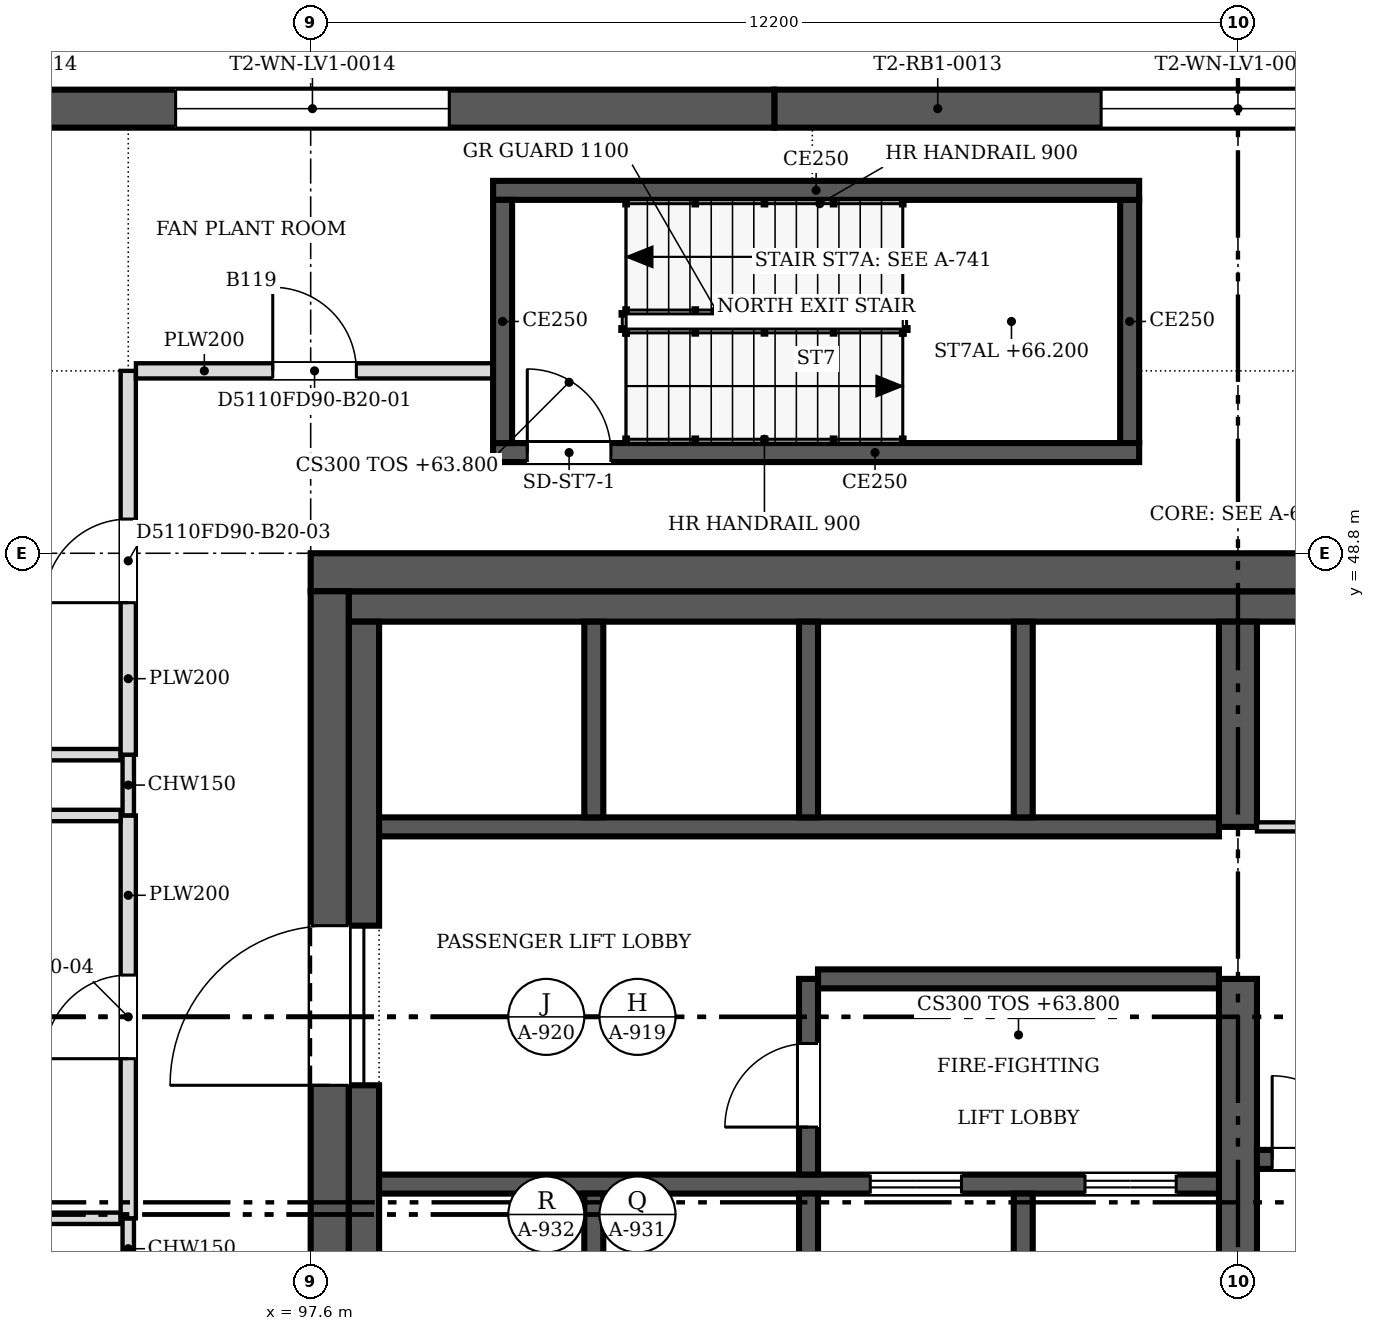
"""IFC4 building model, lengths in metres.
Left out: names, types, materials, properties, quantities, classifications, styles, units other than length and angle.
Written with IfcOpenShell. Run it as: python <this file> out.ifc"""

import sys

from ifc_helpers import new_model, si_unit, direction, frame, frame_2d, origin, place, context, subcontext, project, spatial, polyline, rectangle, outline, extrude, faceted_brep, source, transform, mapped, element, fill, save


model = new_model("IFC4")
c1 = context("Model", 3, precision=1e-05, world=origin(), true_north=direction((0.0, 1.0)))
c2 = subcontext(c1, "Body", "Model", "MODEL_VIEW")
j1 = project(units=[si_unit("LENGTHUNIT", "METRE"), si_unit("PLANEANGLEUNIT", "RADIAN")], contexts=[c1])
p1 = place(None, origin())
s1 = spatial("IfcSite", under=j1, at=p1, CompositionType="ELEMENT")
p2 = place(p1, origin())
s2 = spatial("IfcBuilding", under=s1, at=p2, CompositionType="ELEMENT")
p3 = place(p2, frame((0.0, 0.0, 63.8)))
s3 = spatial("IfcBuildingStorey", under=s2, at=p3, CompositionType="ELEMENT", Elevation=63.8)
m1 = source(origin(), c2, "Body", "SweptSolid", [
    extrude(outline(polyline([(0.0, 0.0), (12.2, 0.0), (12.2, 4.8), (0.0, 4.8), (0.0, 0.0)])), frame((0.0, 0.25, 0.0), z_axis=(0.0, -1.0, 0.0), x_axis=(1.0, 0.0, 0.0)), (0.0, 0.0, 1.0), 0.5),
])
p4 = place(p3, frame((115.9, 54.65, 0.0), z_axis=(0.0, 0.0, 1.0), x_axis=(-1.0, 0.0, 0.0)))
e1 = element("IfcWall", 1, at=p4, inside=s3, PredefinedType="SOLIDWALL", context=c2, shape_type="MappedRepresentation", body=[
    mapped(m1, transform((0.0, 0.0, 0.0), scale=1.0)),
])
m2 = source(origin(), c2, "Body", "SweptSolid", [
    extrude(outline(polyline([(4.3, 0.8), (7.9, 0.8), (7.9, 4.0), (4.3, 4.0), (4.3, 0.8)])), frame((0.0, 0.26, 0.0), z_axis=(0.0, -1.0, 0.0), x_axis=(1.0, 0.0, 0.0)), (0.0, 0.0, 1.0), 0.52),
])
p5 = place(p4, origin())
e2 = element("IfcOpeningElement", 2, at=p5, cuts=e1, PredefinedType="OPENING", context=c2, shape_type="MappedRepresentation", body=[
    mapped(m2, transform((0.0, 0.0, 0.0), scale=1.0)),
])
m3 = source(origin(), c2, "Body", "Brep", [
    faceted_brep([(0.0, -0.25, 0.0), (12.154, -0.25, 0.0), (12.154, -0.25, 4.8), (0.0, -0.25, 4.8), (0.0, 0.25, 4.8), (12.107, 0.25, 4.8), (12.107, 0.25, 0.0), (0.0, 0.25, 0.0), (12.154, -0.0, 0.0), (12.154, -0.0, 4.8)], [[[0, 1, 2, 3]], [[4, 5, 6, 7]], [[7, 6, 8, 1, 0]], [[9, 2, 1, 8]], [[5, 4, 3, 2, 9]], [[4, 7, 0, 3]], [[8, 6, 5, 9]]]),
])
p6 = place(p3, frame((103.7, 54.65, 0.0), z_axis=(0.0, 0.0, 1.0), x_axis=(-1.0, 0.0, 0.0)))
e3 = element("IfcWall", 3, at=p6, inside=s3, PredefinedType="SOLIDWALL", context=c2, shape_type="MappedRepresentation", body=[
    mapped(m3, transform((0.0, 0.0, 0.0), scale=1.0)),
])
m4 = source(origin(), c2, "Body", "SweptSolid", [
    extrude(outline(polyline([(4.277, 0.8), (7.877, 0.8), (7.877, 4.0), (4.277, 4.0), (4.277, 0.8)])), frame((0.0, 0.26, 0.0), z_axis=(0.0, -1.0, 0.0), x_axis=(1.0, 0.0, 0.0)), (0.0, 0.0, 1.0), 0.52),
])
p7 = place(p6, origin())
e4 = element("IfcOpeningElement", 4, at=p7, cuts=e3, PredefinedType="OPENING", context=c2, shape_type="MappedRepresentation", body=[
    mapped(m4, transform((0.0, 0.0, 0.0), scale=1.0)),
])
p8 = place(p3, frame((97.85, 37.1, 0.0), z_axis=(0.0, 0.0, 1.0), x_axis=(0.0, 1.0, 0.0)))
e5 = element("IfcWall", 5, at=p8, inside=s3, PredefinedType="SHEAR", context=c2, shape_type="SweptSolid", body=[
    extrude(rectangle(XDim=11.2, YDim=0.5, at=frame_2d((5.6, 0.0))), origin(), (0.0, 0.0, 1.0), 4.8),
])
m5 = source(origin(), c2, "Body", "SweptSolid", [
    extrude(rectangle(XDim=2.1, YDim=2.4, at=frame_2d((1.05, 1.2))), frame((0.0, 0.26, 0.0), z_axis=(0.0, -1.0, 0.0), x_axis=(1.0, 0.0, 0.0)), (0.0, 0.0, 1.0), 0.52),
])
p9 = place(p8, frame((4.7, 0.0, 0.0)))
e6 = element("IfcOpeningElement", 6, at=p9, cuts=e5, PredefinedType="OPENING", context=c2, shape_type="MappedRepresentation", body=[
    mapped(m5, transform((0.0, 0.0, 0.0), scale=1.0)),
])
p10 = place(p3, frame((97.6, 48.55, 0.0), z_axis=(0.0, 0.0, 1.0), x_axis=(1.0, 0.0, 0.0)))
e7 = element("IfcWall", 7, at=p10, inside=s3, PredefinedType="SHEAR", context=c2, shape_type="SweptSolid", body=[
    extrude(rectangle(XDim=24.4, YDim=0.5, at=frame_2d((12.2, 0.0))), origin(), (0.0, 0.0, 1.0), 4.8),
])
p11 = place(p3, frame((98.1, 48.1, 0.0), z_axis=(0.0, 0.0, 1.0), x_axis=(1.0, 0.0, 0.0)))
e8 = element("IfcWall", 8, at=p11, inside=s3, PredefinedType="SOLIDWALL", context=c2, shape_type="SweptSolid", body=[
    extrude(rectangle(XDim=23.4, YDim=0.4, at=frame_2d((11.7, 0.0))), origin(), (0.0, 0.0, 1.0), 4.8),
])
p12 = place(p3, frame((98.3, 37.5, 0.0), z_axis=(0.0, 0.0, 1.0), x_axis=(0.0, 1.0, 0.0)))
e9 = element("IfcWall", 9, at=p12, inside=s3, PredefinedType="SOLIDWALL", context=c2, shape_type="SweptSolid", body=[
    extrude(rectangle(XDim=4.3, YDim=0.4, at=frame_2d((2.15, 0.0))), origin(), (0.0, 0.0, 1.0), 4.8),
])
p13 = place(p3, frame((98.3, 43.9, 0.0), z_axis=(0.0, 0.0, 1.0), x_axis=(0.0, 1.0, 0.0)))
e10 = element("IfcWall", 10, at=p13, inside=s3, PredefinedType="SOLIDWALL", context=c2, shape_type="SweptSolid", body=[
    extrude(rectangle(XDim=4.0, YDim=0.4, at=frame_2d((2.0, 0.0))), origin(), (0.0, 0.0, 1.0), 4.8),
])
p14 = place(p3, frame((109.8, 37.5, 0.0), z_axis=(0.0, 0.0, 1.0), x_axis=(0.0, 1.0, 0.0)))
e11 = element("IfcWall", 11, at=p14, inside=s3, PredefinedType="SHEAR", context=c2, shape_type="SweptSolid", body=[
    extrude(rectangle(XDim=5.7, YDim=0.5, at=frame_2d((2.85, 0.0))), origin(), (0.0, 0.0, 1.0), 4.8),
])
p15 = place(p3, frame((109.8, 45.2, 0.0), z_axis=(0.0, 0.0, 1.0), x_axis=(0.0, 1.0, 0.0)))
e12 = element("IfcWall", 12, at=p15, inside=s3, PredefinedType="SHEAR", context=c2, shape_type="SweptSolid", body=[
    extrude(rectangle(XDim=2.7, YDim=0.5, at=frame_2d((1.35, 0.0))), origin(), (0.0, 0.0, 1.0), 4.8),
])
p16 = place(p3, frame((98.5, 40.5, 0.0), z_axis=(0.0, 0.0, 1.0), x_axis=(1.0, 0.0, 0.0)))
e13 = element("IfcWall", 13, at=p16, inside=s3, PredefinedType="SOLIDWALL", context=c2, shape_type="SweptSolid", body=[
    extrude(rectangle(XDim=11.05, YDim=0.25, at=frame_2d((5.525, 0.0))), origin(), (0.0, 0.0, 1.0), 4.8),
])
m6 = source(origin(), c2, "Body", "SweptSolid", [
    extrude(rectangle(XDim=1.2, YDim=2.1, at=frame_2d((0.6, 1.05))), frame((0.0, 0.135, 0.0), z_axis=(0.0, -1.0, 0.0), x_axis=(1.0, 0.0, 0.0)), (0.0, 0.0, 1.0), 0.27),
])
p17 = place(p16, frame((6.462, 0.0, 0.0)))
e14 = element("IfcOpeningElement", 14, at=p17, cuts=e13, PredefinedType="OPENING", context=c2, shape_type="MappedRepresentation", body=[
    mapped(m6, transform((0.0, 0.0, 0.0), scale=1.0)),
])
p18 = place(p16, frame((9.288, 0.0, 0.0)))
e15 = element("IfcOpeningElement", 15, at=p18, cuts=e13, PredefinedType="OPENING", context=c2, shape_type="MappedRepresentation", body=[
    mapped(m6, transform((0.0, 0.0, 0.0), scale=1.0)),
])
p19 = place(p3, frame((98.5, 45.2, 0.0), z_axis=(0.0, 0.0, 1.0), x_axis=(1.0, 0.0, 0.0)))
e16 = element("IfcWall", 16, at=p19, inside=s3, PredefinedType="SOLIDWALL", context=c2, shape_type="SweptSolid", body=[
    extrude(rectangle(XDim=11.05, YDim=0.25, at=frame_2d((5.525, 0.0))), origin(), (0.0, 0.0, 1.0), 4.8),
])
p20 = place(p3, frame((118.1, 40.825, 0.0), z_axis=(0.0, 0.0, 1.0), x_axis=(-1.0, 0.0, 0.0)))
e17 = element("IfcWall", 17, at=p20, inside=s3, PredefinedType="SOLIDWALL", context=c2, shape_type="SweptSolid", body=[
    extrude(rectangle(XDim=8.05, YDim=0.25, at=frame_2d((4.025, 0.0))), origin(), (0.0, 0.0, 1.0), 4.8),
])
m7 = source(origin(), c2, "Body", "SweptSolid", [
    extrude(rectangle(XDim=1.1, YDim=2.1, at=frame_2d((0.55, 1.05))), frame((0.0, 0.135, 0.0), z_axis=(0.0, -1.0, 0.0), x_axis=(1.0, 0.0, 0.0)), (0.0, 0.0, 1.0), 0.27),
])
p21 = place(p20, frame((6.75, 0.0, 0.0)))
e18 = element("IfcOpeningElement", 18, at=p21, cuts=e17, PredefinedType="OPENING", context=c2, shape_type="MappedRepresentation", body=[
    mapped(m7, transform((0.0, 0.0, 0.0), scale=1.0)),
])
p22 = place(p3, frame((104.15, 37.5, 0.0), z_axis=(0.0, 0.0, 1.0), x_axis=(0.0, 1.0, 0.0)))
e19 = element("IfcWall", 19, at=p22, inside=s3, PredefinedType="SOLIDWALL", context=c2, shape_type="SweptSolid", body=[
    extrude(rectangle(XDim=2.875, YDim=0.25, at=frame_2d((1.438, 0.0))), origin(), (0.0, 0.0, 1.0), 4.8),
])
p23 = place(p3, frame((104.15, 43.2, 0.0), z_axis=(0.0, 0.0, 1.0), x_axis=(0.0, -1.0, 0.0)))
e20 = element("IfcWall", 20, at=p23, inside=s3, PredefinedType="SOLIDWALL", context=c2, shape_type="SweptSolid", body=[
    extrude(rectangle(XDim=2.575, YDim=0.25, at=frame_2d((1.288, 0.0))), origin(), (0.0, 0.0, 1.0), 4.8),
])
p24 = place(p23, frame((0.85, 0.0, 0.0)))
e21 = element("IfcOpeningElement", 21, at=p24, cuts=e20, PredefinedType="OPENING", context=c2, shape_type="MappedRepresentation", body=[
    mapped(m7, transform((0.0, 0.0, 0.0), scale=1.0)),
])
p25 = place(p3, frame((104.275, 43.2, 0.0), z_axis=(0.0, 0.0, 1.0), x_axis=(1.0, 0.0, 0.0)))
e22 = element("IfcWall", 22, at=p25, inside=s3, PredefinedType="SOLIDWALL", context=c2, shape_type="SweptSolid", body=[
    extrude(rectangle(XDim=5.275, YDim=0.25, at=frame_2d((2.638, 0.0))), origin(), (0.0, 0.0, 1.0), 4.8),
])
for number, where, z_axis, x_axis in (
    (23, (101.325, 37.5, 0.0), (0.0, 0.0, 1.0), (0.0, 1.0, 0.0)),
    (24, (106.975, 37.5, 0.0), (0.0, 0.0, 1.0), (0.0, 1.0, 0.0)),
):
    element("IfcWall", number, at=place(p3, frame(where, z_axis=z_axis, x_axis=x_axis)), inside=s3, PredefinedType="SOLIDWALL", context=c2, shape_type="SweptSolid", body=[
        extrude(rectangle(XDim=2.875, YDim=0.25, at=frame_2d((1.438, 0.0))), origin(), (0.0, 0.0, 1.0), 4.8),
    ])
for number, where, z_axis, x_axis in (
    (25, (101.325, 45.325, 0.0), (0.0, 0.0, 1.0), (0.0, 1.0, 0.0)),
    (26, (104.15, 45.325, 0.0), (0.0, 0.0, 1.0), (0.0, 1.0, 0.0)),
    (27, (106.975, 45.325, 0.0), (0.0, 0.0, 1.0), (0.0, 1.0, 0.0)),
):
    element("IfcWall", number, at=place(p3, frame(where, z_axis=z_axis, x_axis=x_axis)), inside=s3, PredefinedType="SOLIDWALL", context=c2, shape_type="SweptSolid", body=[
        extrude(rectangle(XDim=2.575, YDim=0.25, at=frame_2d((1.288, 0.0))), origin(), (0.0, 0.0, 1.0), 4.8),
    ])
p26 = place(p3, frame((110.05, 45.2, 0.0), z_axis=(0.0, 0.0, 1.0), x_axis=(1.0, 0.0, 0.0)))
e28 = element("IfcWall", 28, at=p26, inside=s3, PredefinedType="PARTITIONING", context=c2, shape_type="SweptSolid", body=[
    extrude(rectangle(XDim=11.05, YDim=0.12, at=frame_2d((5.525, 0.0))), origin(), (0.0, 0.0, 1.0), 4.6),
])
m8 = source(origin(), c2, "Body", "SweptSolid", [
    extrude(rectangle(XDim=0.9, YDim=2.1, at=frame_2d((0.45, 1.05))), frame((0.0, 0.07, 0.0), z_axis=(0.0, -1.0, 0.0), x_axis=(1.0, 0.0, 0.0)), (0.0, 0.0, 1.0), 0.14),
])
p27 = place(p26, frame((2.125, 0.0, 0.0)))
e29 = element("IfcOpeningElement", 29, at=p27, cuts=e28, PredefinedType="OPENING", context=c2, shape_type="MappedRepresentation", body=[
    mapped(m8, transform((0.0, 0.0, 0.0), scale=1.0)),
])
p28 = place(p26, frame((7.775, 0.0, 0.0)))
e30 = element("IfcOpeningElement", 30, at=p28, cuts=e28, PredefinedType="OPENING", context=c2, shape_type="MappedRepresentation", body=[
    mapped(m8, transform((0.0, 0.0, 0.0), scale=1.0)),
])
p29 = place(p3, frame((108.5, 50.125, 0.0), z_axis=(0.0, 0.0, 1.0), x_axis=(-1.0, 0.0, 0.0)))
e31 = element("IfcWall", 31, at=p29, inside=s3, PredefinedType="SOLIDWALL", context=c2, shape_type="SweptSolid", body=[
    extrude(rectangle(XDim=8.5, YDim=0.25, at=frame_2d((4.25, 0.0))), origin(), (0.0, 0.0, 1.0), 4.8),
])
p30 = place(p29, frame((6.95, 0.0, 0.0)))
e32 = element("IfcOpeningElement", 32, at=p30, cuts=e31, PredefinedType="OPENING", context=c2, shape_type="MappedRepresentation", body=[
    mapped(m7, transform((0.0, 0.0, 0.0), scale=1.0)),
])
p31 = place(p3, frame((100.125, 50.25, 0.0), z_axis=(0.0, 0.0, 1.0), x_axis=(0.0, 1.0, 0.0)))
e33 = element("IfcWall", 33, at=p31, inside=s3, PredefinedType="SOLIDWALL", context=c2, shape_type="SweptSolid", body=[
    extrude(rectangle(XDim=3.2, YDim=0.25, at=frame_2d((1.6, 0.0))), origin(), (0.0, 0.0, 1.0), 4.8),
])
p32 = place(p3, frame((100.0, 53.575, 0.0), z_axis=(0.0, 0.0, 1.0), x_axis=(1.0, 0.0, 0.0)))
e34 = element("IfcWall", 34, at=p32, inside=s3, PredefinedType="SOLIDWALL", context=c2, shape_type="SweptSolid", body=[
    extrude(rectangle(XDim=8.5, YDim=0.25, at=frame_2d((4.25, 0.0))), origin(), (0.0, 0.0, 1.0), 4.8),
])
p33 = place(p3, frame((108.375, 53.45, 0.0), z_axis=(0.0, 0.0, 1.0), x_axis=(0.0, -1.0, 0.0)))
e35 = element("IfcWall", 35, at=p33, inside=s3, PredefinedType="SOLIDWALL", context=c2, shape_type="SweptSolid", body=[
    extrude(rectangle(XDim=3.2, YDim=0.25, at=frame_2d((1.6, 0.0))), origin(), (0.0, 0.0, 1.0), 4.8),
])
p34 = place(p3, frame((95.2, 39.25, 0.0), z_axis=(0.0, 0.0, 1.0), x_axis=(0.0, 1.0, 0.0)))
e36 = element("IfcWall", 36, at=p34, inside=s3, PredefinedType="PARTITIONING", context=c2, shape_type="SweptSolid", body=[
    extrude(rectangle(XDim=0.799, YDim=0.15, at=frame_2d((0.399, 0.0))), origin(), (0.0, 0.0, 1.0), 4.067),
])
p35 = place(p3, frame((85.9, 40.05, 0.0), z_axis=(0.0, 0.0, 1.0), x_axis=(1.0, 0.0, 0.0)))
e37 = element("IfcWall", 37, at=p35, inside=s3, PredefinedType="PARTITIONING", context=c2, shape_type="SweptSolid", body=[
    extrude(rectangle(XDim=9.199, YDim=0.15, at=frame_2d((4.6, 0.0))), origin(), (0.0, 0.0, 1.0), 4.067),
])
p36 = place(p3, frame((95.2, 40.05, 0.0), z_axis=(0.0, 0.0, 1.0), x_axis=(0.0, 1.0, 0.0)))
e38 = element("IfcWall", 38, at=p36, inside=s3, PredefinedType="PARTITIONING", context=c2, shape_type="SweptSolid", body=[
    extrude(rectangle(XDim=5.3, YDim=0.2, at=frame_2d((2.65, 0.0))), origin(), (0.0, 0.0, 1.0), 4.067),
])
m9 = source(origin(), c2, "Body", "SweptSolid", [
    extrude(rectangle(XDim=1.1, YDim=2.1, at=frame_2d((0.55, 1.05))), frame((0.0, 0.11, 0.0), z_axis=(0.0, -1.0, 0.0), x_axis=(1.0, 0.0, 0.0)), (0.0, 0.0, 1.0), 0.22),
])
p37 = place(p36, frame((2.1, 0.0, 0.0)))
e39 = element("IfcOpeningElement", 39, at=p37, cuts=e38, PredefinedType="OPENING", context=c2, shape_type="MappedRepresentation", body=[
    mapped(m9, transform((0.0, 0.0, 0.0), scale=1.0)),
])
p38 = place(p3, frame((85.9, 45.35, 0.0), z_axis=(0.0, 0.0, 1.0), x_axis=(1.0, 0.0, 0.0)))
e40 = element("IfcWall", 40, at=p38, inside=s3, PredefinedType="PARTITIONING", context=c2, shape_type="SweptSolid", body=[
    extrude(rectangle(XDim=9.199, YDim=0.15, at=frame_2d((4.6, 0.0))), origin(), (0.0, 0.0, 1.0), 4.067),
])
p39 = place(p3, frame((95.2, 45.351, 0.0), z_axis=(0.0, 0.0, 1.0), x_axis=(0.0, 1.0, 0.0)))
e41 = element("IfcWall", 41, at=p39, inside=s3, PredefinedType="PARTITIONING", context=c2, shape_type="SweptSolid", body=[
    extrude(rectangle(XDim=0.798, YDim=0.15, at=frame_2d((0.399, 0.0))), origin(), (0.0, 0.0, 1.0), 4.067),
])
p40 = place(p3, frame((85.9, 46.15, 0.0), z_axis=(0.0, 0.0, 1.0), x_axis=(1.0, 0.0, 0.0)))
e42 = element("IfcWall", 42, at=p40, inside=s3, PredefinedType="PARTITIONING", context=c2, shape_type="SweptSolid", body=[
    extrude(rectangle(XDim=9.199, YDim=0.15, at=frame_2d((4.6, 0.0))), origin(), (0.0, 0.0, 1.0), 4.067),
])
p41 = place(p3, frame((95.2, 46.15, 0.0), z_axis=(0.0, 0.0, 1.0), x_axis=(0.0, 1.0, 0.0)))
e43 = element("IfcWall", 43, at=p41, inside=s3, PredefinedType="PARTITIONING", context=c2, shape_type="SweptSolid", body=[
    extrude(rectangle(XDim=5.05, YDim=0.2, at=frame_2d((2.525, 0.0))), origin(), (0.0, 0.0, 1.0), 4.067),
])
p42 = place(p41, frame((2.0, 0.0, 0.0)))
e44 = element("IfcOpeningElement", 44, at=p42, cuts=e43, PredefinedType="OPENING", context=c2, shape_type="MappedRepresentation", body=[
    mapped(m9, transform((0.0, 0.0, 0.0), scale=1.0)),
])
p43 = place(p3, frame((95.301, 51.2, 0.0), z_axis=(0.0, 0.0, 1.0), x_axis=(1.0, 0.0, 0.0)))
e45 = element("IfcWall", 45, at=p43, inside=s3, PredefinedType="PARTITIONING", context=c2, shape_type="SweptSolid", body=[
    extrude(rectangle(XDim=4.699, YDim=0.2, at=frame_2d((2.35, 0.0))), origin(), (0.0, 0.0, 1.0), 4.067),
])
p44 = place(p43, frame((1.8, 0.0, 0.0)))
e46 = element("IfcOpeningElement", 46, at=p44, cuts=e45, PredefinedType="OPENING", context=c2, shape_type="MappedRepresentation", body=[
    mapped(m9, transform((0.0, 0.0, 0.0), scale=1.0)),
])
m10 = source(origin(), c2, "Body", "SweptSolid", [
    extrude(outline(polyline([(4.3, 0.8), (7.9, 0.8), (7.9, 4.0), (4.3, 4.0), (4.3, 0.8)])), frame((0.0, 0.03, 0.0), z_axis=(0.0, -1.0, 0.0), x_axis=(1.0, 0.0, 0.0)), (0.0, 0.0, 1.0), 0.06),
])
p45 = place(p5, origin())
e47 = element("IfcWindow", 47, at=p45, inside=s3, PartitioningType="USERDEFINED", PredefinedType="WINDOW", context=c2, shape_type="MappedRepresentation", body=[
    mapped(m10, transform((0.0, 0.0, 0.0), scale=1.0)),
])
fill(e2, e47)
m11 = source(origin(), c2, "Body", "SweptSolid", [
    extrude(outline(polyline([(4.277, 0.8), (7.877, 0.8), (7.877, 4.0), (4.277, 4.0), (4.277, 0.8)])), frame((0.0, 0.03, 0.0), z_axis=(0.0, -1.0, 0.0), x_axis=(1.0, 0.0, 0.0)), (0.0, 0.0, 1.0), 0.06),
])
p46 = place(p7, origin())
e48 = element("IfcWindow", 48, at=p46, inside=s3, PartitioningType="USERDEFINED", PredefinedType="WINDOW", context=c2, shape_type="MappedRepresentation", body=[
    mapped(m11, transform((0.0, 0.0, 0.0), scale=1.0)),
])
fill(e4, e48)
m12 = source(origin(), c2, "Body", "SweptSolid", [
    extrude(rectangle(XDim=2.1, YDim=2.4, at=frame_2d((1.05, 1.2))), frame((0.0, 0.025, 0.0), z_axis=(0.0, -1.0, 0.0), x_axis=(1.0, 0.0, 0.0)), (0.0, 0.0, 1.0), 0.05),
])
p47 = place(p9, origin())
e49 = element("IfcDoor", 49, at=p47, inside=s3, OperationType="DOUBLE_DOOR_SINGLE_SWING", PredefinedType="DOOR", context=c2, shape_type="MappedRepresentation", body=[
    mapped(m12, transform((0.0, 0.0, 0.0), scale=1.0)),
])
fill(e6, e49)
m13 = source(origin(), c2, "Body", "SweptSolid", [
    extrude(rectangle(XDim=1.2, YDim=2.1, at=frame_2d((0.6, 1.05))), frame((0.0, 0.025, 0.0), z_axis=(0.0, -1.0, 0.0), x_axis=(1.0, 0.0, 0.0)), (0.0, 0.0, 1.0), 0.05),
])
p48 = place(p17, origin())
e50 = element("IfcDoor", 50, at=p48, inside=s3, OperationType="DOUBLE_DOOR_SLIDING", PredefinedType="DOOR", context=c2, shape_type="MappedRepresentation", body=[
    mapped(m13, transform((0.0, 0.0, 0.0), scale=1.0)),
])
fill(e14, e50)
p49 = place(p18, origin())
e51 = element("IfcDoor", 51, at=p49, inside=s3, OperationType="DOUBLE_DOOR_SLIDING", PredefinedType="DOOR", context=c2, shape_type="MappedRepresentation", body=[
    mapped(m13, transform((0.0, 0.0, 0.0), scale=1.0)),
])
fill(e15, e51)
m14 = source(origin(), c2, "Body", "SweptSolid", [
    extrude(rectangle(XDim=1.1, YDim=2.1, at=frame_2d((0.55, 1.05))), frame((0.0, 0.025, 0.0), z_axis=(0.0, -1.0, 0.0), x_axis=(1.0, 0.0, 0.0)), (0.0, 0.0, 1.0), 0.05),
])
p50 = place(p21, origin())
e52 = element("IfcDoor", 52, at=p50, inside=s3, OperationType="SINGLE_SWING_RIGHT", PredefinedType="DOOR", context=c2, shape_type="MappedRepresentation", body=[
    mapped(m14, transform((0.0, 0.0, 0.0), scale=1.0)),
])
fill(e18, e52)
p51 = place(p24, origin())
e53 = element("IfcDoor", 53, at=p51, inside=s3, OperationType="SINGLE_SWING_RIGHT", PredefinedType="DOOR", context=c2, shape_type="MappedRepresentation", body=[
    mapped(m14, transform((0.0, 0.0, 0.0), scale=1.0)),
])
fill(e21, e53)
p52 = place(p30, origin())
e54 = element("IfcDoor", 54, at=p52, inside=s3, OperationType="SINGLE_SWING_RIGHT", PredefinedType="DOOR", context=c2, shape_type="MappedRepresentation", body=[
    mapped(m14, transform((0.0, 0.0, 0.0), scale=1.0)),
])
fill(e32, e54)
p53 = place(p44, origin())
e55 = element("IfcDoor", 55, at=p53, inside=s3, OperationType="SINGLE_SWING_LEFT", PredefinedType="DOOR", context=c2, shape_type="MappedRepresentation", body=[
    mapped(m14, transform((0.0, 0.0, 0.0), scale=1.0)),
])
fill(e46, e55)
p54 = place(p42, origin())
e56 = element("IfcDoor", 56, at=p54, inside=s3, OperationType="SINGLE_SWING_LEFT", PredefinedType="DOOR", context=c2, shape_type="MappedRepresentation", body=[
    mapped(m14, transform((0.0, 0.0, 0.0), scale=1.0)),
])
fill(e44, e56)
p55 = place(p37, origin())
e57 = element("IfcDoor", 57, at=p55, inside=s3, OperationType="SINGLE_SWING_LEFT", PredefinedType="DOOR", context=c2, shape_type="MappedRepresentation", body=[
    mapped(m14, transform((0.0, 0.0, 0.0), scale=1.0)),
])
fill(e39, e57)
save(model, sys.argv[1])
